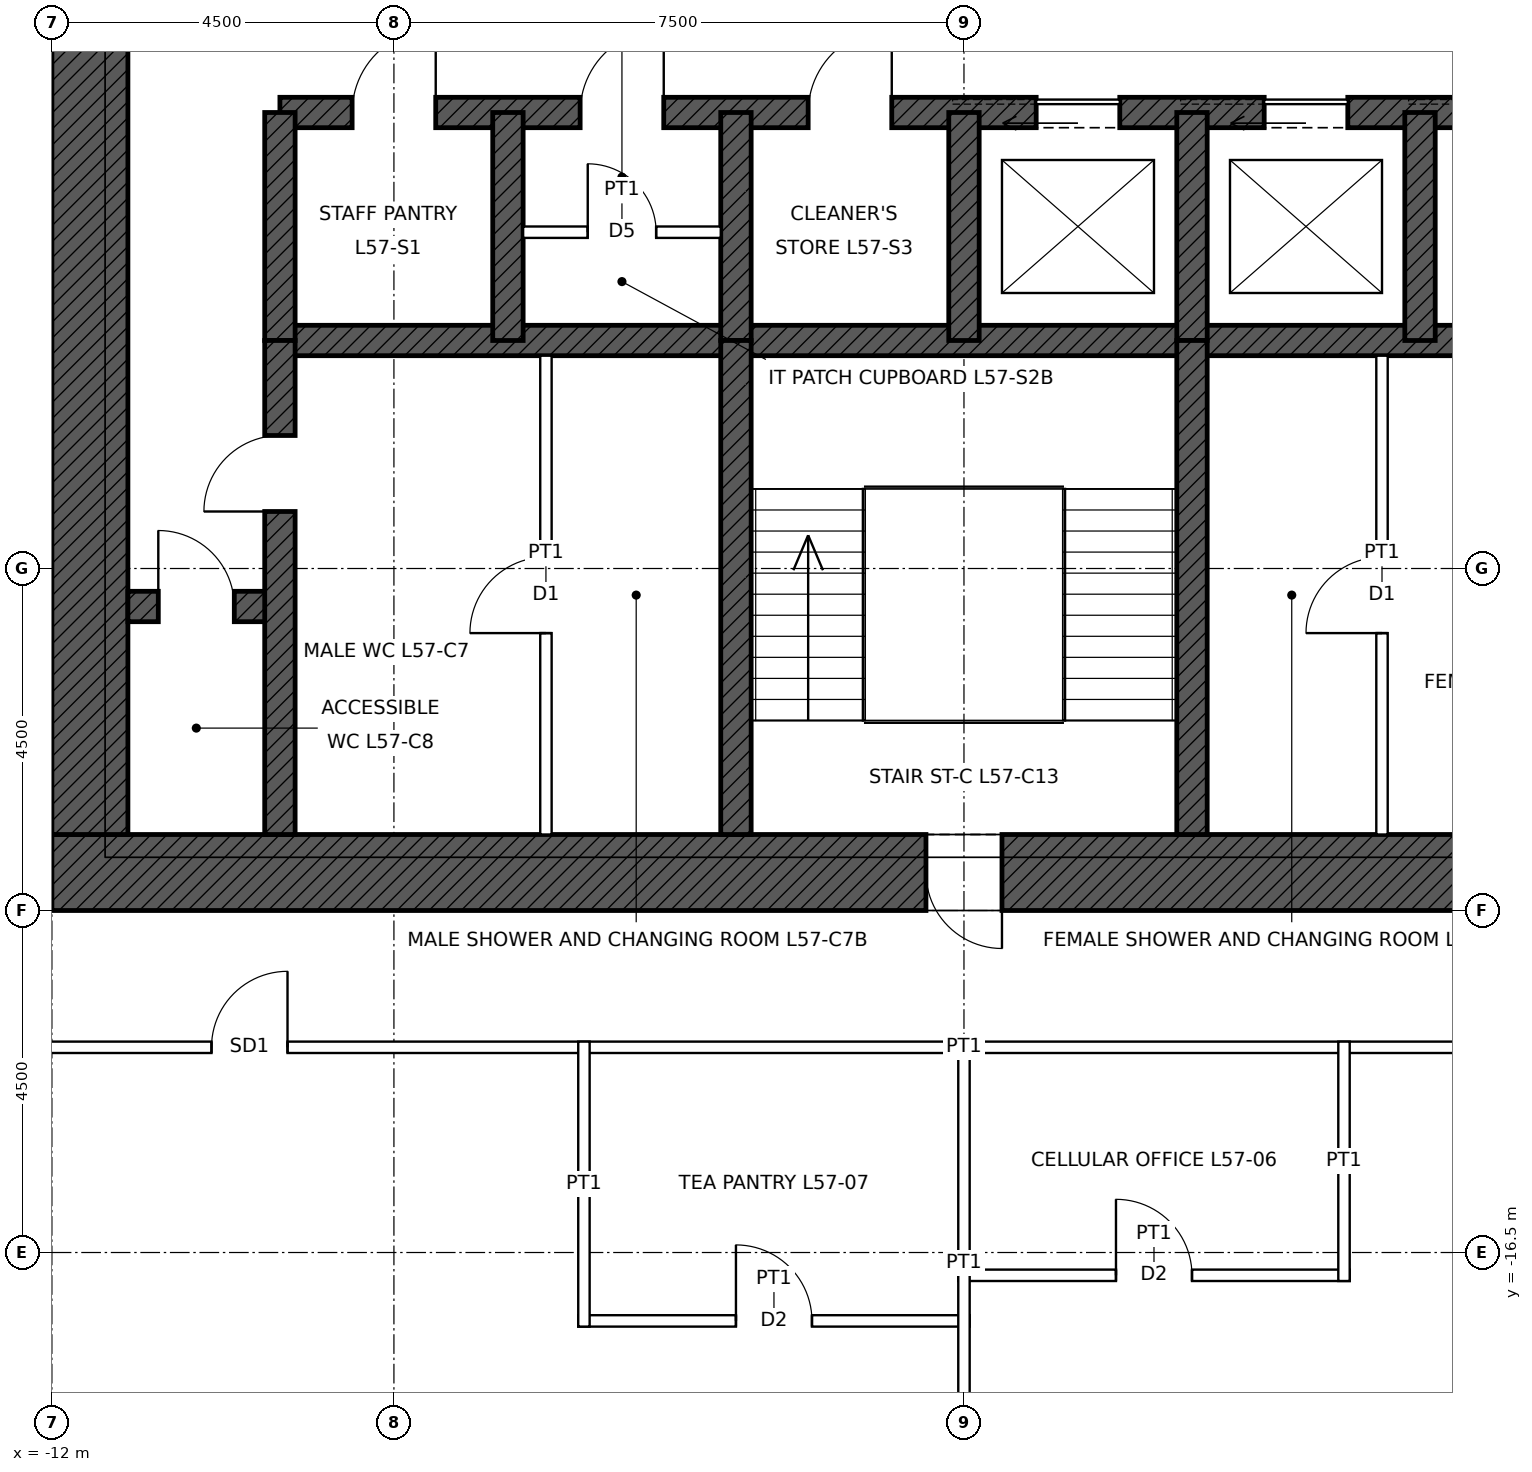
"""IFC4 building model, lengths in metres.
Left out: names, types, materials, properties, quantities, classifications, styles, units other than length and angle.
Written with IfcOpenShell. Run it as: python <this file> out.ifc"""

import sys

from ifc_helpers import new_model, si_unit, direction, frame, frame_2d, origin, place, context, subcontext, project, spatial, rectangle, extrude, element, fill, save


model = new_model("IFC4")
c1 = context("Model", 3, precision=1e-05, world=origin(), true_north=direction((0.0, 1.0)))
c2 = subcontext(c1, "Body", "Model", "MODEL_VIEW")
j1 = project(units=[si_unit("LENGTHUNIT", "METRE"), si_unit("PLANEANGLEUNIT", "RADIAN")], contexts=[c1])
p1 = place(None, origin())
s1 = spatial("IfcSite", under=j1, at=p1, CompositionType="ELEMENT")
p2 = place(p1, origin())
s2 = spatial("IfcBuilding", under=s1, at=p2, CompositionType="ELEMENT")
p3 = place(p2, frame((0.0, 0.0, 263.9)))
s3 = spatial("IfcBuildingStorey", under=s2, at=p3, CompositionType="ELEMENT", Elevation=263.9)
p4 = place(p3, frame((12.0, -11.5, 0.0), z_axis=(0.0, 0.0, 1.0), x_axis=(-1.0, 0.0, 0.0)))
e1 = element("IfcWall", 1, at=p4, inside=s3, PredefinedType="SHEAR", context=c2, shape_type="SweptSolid", body=[
    extrude(rectangle(XDim=24.0, YDim=1.0, at=frame_2d((12.0, 0.0))), origin(), (0.0, 0.0, 1.0), 4.0),
])
p5 = place(p4, frame((11.5, 0.0, 0.0)))
e2 = element("IfcOpeningElement", 2, at=p5, cuts=e1, PredefinedType="OPENING", context=c2, shape_type="SweptSolid", body=[
    extrude(rectangle(XDim=1.0, YDim=2.1, at=frame_2d((0.5, 1.05))), frame((0.0, 0.51, 0.0), z_axis=(0.0, -1.0, 0.0), x_axis=(1.0, 0.0, 0.0)), (0.0, 0.0, 1.0), 1.02),
])
p6 = place(p4, frame((1.0, 0.0, 0.0)))
e3 = element("IfcOpeningElement", 3, at=p6, cuts=e1, PredefinedType="OPENING", context=c2, shape_type="SweptSolid", body=[
    extrude(rectangle(XDim=1.0, YDim=2.4, at=frame_2d((0.5, 1.2))), frame((0.0, 0.51, 0.0), z_axis=(0.0, -1.0, 0.0), x_axis=(1.0, 0.0, 0.0)), (0.0, 0.0, 1.0), 1.02),
])
p7 = place(p3, frame((-11.5, -11.0, 0.0), z_axis=(0.0, 0.0, 1.0), x_axis=(0.0, 1.0, 0.0)))
e4 = element("IfcWall", 4, at=p7, inside=s3, PredefinedType="SHEAR", context=c2, shape_type="SweptSolid", body=[
    extrude(rectangle(XDim=22.0, YDim=1.0, at=frame_2d((11.0, 0.0))), origin(), (0.0, 0.0, 1.0), 4.0),
])
p8 = place(p7, frame((10.5, 0.0, 0.0)))
e5 = element("IfcOpeningElement", 5, at=p8, cuts=e4, PredefinedType="OPENING", context=c2, shape_type="SweptSolid", body=[
    extrude(rectangle(XDim=1.0, YDim=2.4, at=frame_2d((0.5, 1.2))), frame((0.0, 0.51, 0.0), z_axis=(0.0, -1.0, 0.0), x_axis=(1.0, 0.0, 0.0)), (0.0, 0.0, 1.0), 1.02),
])
p9 = place(p3, frame((-9.0, -1.5, 0.0), z_axis=(0.0, 0.0, 1.0), x_axis=(1.0, 0.0, 0.0)))
e6 = element("IfcWall", 6, at=p9, inside=s3, PredefinedType="SHEAR", context=c2, shape_type="SweptSolid", body=[
    extrude(rectangle(XDim=18.0, YDim=0.4, at=frame_2d((9.0, 0.0))), origin(), (0.0, 0.0, 1.0), 4.0),
])
p10 = place(p9, frame((9.95, 0.0, 0.0)))
e7 = element("IfcOpeningElement", 7, at=p10, cuts=e6, PredefinedType="OPENING", context=c2, shape_type="SweptSolid", body=[
    extrude(rectangle(XDim=1.1, YDim=2.1, at=frame_2d((0.55, 1.05))), frame((0.0, 0.21, 0.0), z_axis=(0.0, -1.0, 0.0), x_axis=(1.0, 0.0, 0.0)), (0.0, 0.0, 1.0), 0.42),
])
p11 = place(p9, frame((12.95, 0.0, 0.0)))
e8 = element("IfcOpeningElement", 8, at=p11, cuts=e6, PredefinedType="OPENING", context=c2, shape_type="SweptSolid", body=[
    extrude(rectangle(XDim=1.1, YDim=2.1, at=frame_2d((0.55, 1.05))), frame((0.0, 0.21, 0.0), z_axis=(0.0, -1.0, 0.0), x_axis=(1.0, 0.0, 0.0)), (0.0, 0.0, 1.0), 0.42),
])
p12 = place(p9, frame((15.95, 0.0, 0.0)))
e9 = element("IfcOpeningElement", 9, at=p12, cuts=e6, PredefinedType="OPENING", context=c2, shape_type="SweptSolid", body=[
    extrude(rectangle(XDim=1.1, YDim=2.1, at=frame_2d((0.55, 1.05))), frame((0.0, 0.21, 0.0), z_axis=(0.0, -1.0, 0.0), x_axis=(1.0, 0.0, 0.0)), (0.0, 0.0, 1.0), 0.42),
])
p13 = place(p9, frame((0.95, 0.0, 0.0)))
e10 = element("IfcOpeningElement", 10, at=p13, cuts=e6, PredefinedType="OPENING", context=c2, shape_type="SweptSolid", body=[
    extrude(rectangle(XDim=1.1, YDim=2.1, at=frame_2d((0.55, 1.05))), frame((0.0, 0.21, 0.0), z_axis=(0.0, -1.0, 0.0), x_axis=(1.0, 0.0, 0.0)), (0.0, 0.0, 1.0), 0.42),
])
p14 = place(p9, frame((3.95, 0.0, 0.0)))
e11 = element("IfcOpeningElement", 11, at=p14, cuts=e6, PredefinedType="OPENING", context=c2, shape_type="SweptSolid", body=[
    extrude(rectangle(XDim=1.1, YDim=2.1, at=frame_2d((0.55, 1.05))), frame((0.0, 0.21, 0.0), z_axis=(0.0, -1.0, 0.0), x_axis=(1.0, 0.0, 0.0)), (0.0, 0.0, 1.0), 0.42),
])
p15 = place(p9, frame((6.95, 0.0, 0.0)))
e12 = element("IfcOpeningElement", 12, at=p15, cuts=e6, PredefinedType="OPENING", context=c2, shape_type="SweptSolid", body=[
    extrude(rectangle(XDim=1.1, YDim=2.1, at=frame_2d((0.55, 1.05))), frame((0.0, 0.21, 0.0), z_axis=(0.0, -1.0, 0.0), x_axis=(1.0, 0.0, 0.0)), (0.0, 0.0, 1.0), 0.42),
])
p16 = place(p3, frame((-9.0, -4.5, 0.0), z_axis=(0.0, 0.0, 1.0), x_axis=(1.0, 0.0, 0.0)))
e13 = element("IfcWall", 13, at=p16, inside=s3, PredefinedType="SHEAR", context=c2, shape_type="SweptSolid", body=[
    extrude(rectangle(XDim=18.0, YDim=0.4, at=frame_2d((9.0, 0.0))), origin(), (0.0, 0.0, 1.0), 4.0),
])
p17 = place(p3, frame((-11.0, -8.0, 0.0), z_axis=(0.0, 0.0, 1.0), x_axis=(1.0, 0.0, 0.0)))
e14 = element("IfcWall", 14, at=p17, inside=s3, PredefinedType="SHEAR", context=c2, shape_type="SweptSolid", body=[
    extrude(rectangle(XDim=2.0, YDim=0.4, at=frame_2d((1.0, 0.0))), origin(), (0.0, 0.0, 1.0), 4.0),
])
p18 = place(p17, frame((0.4, 0.0, 0.0)))
e15 = element("IfcOpeningElement", 15, at=p18, cuts=e14, PredefinedType="OPENING", context=c2, shape_type="SweptSolid", body=[
    extrude(rectangle(XDim=1.0, YDim=2.1, at=frame_2d((0.5, 1.05))), frame((0.0, 0.21, 0.0), z_axis=(0.0, -1.0, 0.0), x_axis=(1.0, 0.0, 0.0)), (0.0, 0.0, 1.0), 0.42),
])
for number, where, z_axis, x_axis in (
    (16, (-9.0, -4.5, 0.0), (0.0, 0.0, 1.0), (0.0, 1.0, 0.0)),
    (17, (-6.0, -4.5, 0.0), (0.0, 0.0, 1.0), (0.0, 1.0, 0.0)),
    (18, (-3.0, -4.5, 0.0), (0.0, 0.0, 1.0), (0.0, 1.0, 0.0)),
    (19, (0.0, -4.5, 0.0), (0.0, 0.0, 1.0), (0.0, 1.0, 0.0)),
    (20, (3.0, -4.5, 0.0), (0.0, 0.0, 1.0), (0.0, 1.0, 0.0)),
    (21, (6.0, -4.5, 0.0), (0.0, 0.0, 1.0), (0.0, 1.0, 0.0)),
):
    element("IfcWall", number, at=place(p3, frame(where, z_axis=z_axis, x_axis=x_axis)), inside=s3, PredefinedType="SHEAR", context=c2, shape_type="SweptSolid", body=[
        extrude(rectangle(XDim=3.0, YDim=0.4, at=frame_2d((1.5, 0.0))), origin(), (0.0, 0.0, 1.0), 4.0),
    ])
p19 = place(p3, frame((-9.0, -11.0, 0.0), z_axis=(0.0, 0.0, 1.0), x_axis=(0.0, 1.0, 0.0)))
e22 = element("IfcWall", 22, at=p19, inside=s3, PredefinedType="SHEAR", context=c2, shape_type="SweptSolid", body=[
    extrude(rectangle(XDim=6.5, YDim=0.4, at=frame_2d((3.25, 0.0))), origin(), (0.0, 0.0, 1.0), 4.0),
])
p20 = place(p19, frame((4.25, 0.0, 0.0)))
e23 = element("IfcOpeningElement", 23, at=p20, cuts=e22, PredefinedType="OPENING", context=c2, shape_type="SweptSolid", body=[
    extrude(rectangle(XDim=1.0, YDim=2.1, at=frame_2d((0.5, 1.05))), frame((0.0, 0.21, 0.0), z_axis=(0.0, -1.0, 0.0), x_axis=(1.0, 0.0, 0.0)), (0.0, 0.0, 1.0), 0.42),
])
for number, where, z_axis, x_axis in (
    (24, (-3.0, -11.0, 0.0), (0.0, 0.0, 1.0), (0.0, 1.0, 0.0)),
    (25, (3.0, -11.0, 0.0), (0.0, 0.0, 1.0), (0.0, 1.0, 0.0)),
):
    element("IfcWall", number, at=place(p3, frame(where, z_axis=z_axis, x_axis=x_axis)), inside=s3, PredefinedType="SHEAR", context=c2, shape_type="SweptSolid", body=[
        extrude(rectangle(XDim=6.5, YDim=0.4, at=frame_2d((3.25, 0.0))), origin(), (0.0, 0.0, 1.0), 4.0),
    ])
p21 = place(p3, frame((-5.075, -17.4, 0.0), z_axis=(0.0, 0.0, 1.0), x_axis=(1.0, 0.0, 0.0)))
e26 = element("IfcWall", 26, at=p21, inside=s3, PredefinedType="PARTITIONING", context=c2, shape_type="SweptSolid", body=[
    extrude(rectangle(XDim=5.15, YDim=0.15, at=frame_2d((2.575, 0.0))), origin(), (0.0, 0.0, 1.0), 3.85),
])
p22 = place(p21, frame((2.075, 0.0, 0.0)))
e27 = element("IfcOpeningElement", 27, at=p22, cuts=e26, PredefinedType="OPENING", context=c2, shape_type="SweptSolid", body=[
    extrude(rectangle(XDim=1.0, YDim=2.1, at=frame_2d((0.5, 1.05))), frame((0.0, 0.085, 0.0), z_axis=(0.0, -1.0, 0.0), x_axis=(1.0, 0.0, 0.0)), (0.0, 0.0, 1.0), 0.17),
])
p23 = place(p3, frame((-0.075, -16.8, 0.0), z_axis=(0.0, 0.0, 1.0), x_axis=(1.0, 0.0, 0.0)))
e28 = element("IfcWall", 28, at=p23, inside=s3, PredefinedType="PARTITIONING", context=c2, shape_type="SweptSolid", body=[
    extrude(rectangle(XDim=5.15, YDim=0.15, at=frame_2d((2.575, 0.0))), origin(), (0.0, 0.0, 1.0), 3.85),
])
p24 = place(p23, frame((2.075, 0.0, 0.0)))
e29 = element("IfcOpeningElement", 29, at=p24, cuts=e28, PredefinedType="OPENING", context=c2, shape_type="SweptSolid", body=[
    extrude(rectangle(XDim=1.0, YDim=2.1, at=frame_2d((0.5, 1.05))), frame((0.0, 0.085, 0.0), z_axis=(0.0, -1.0, 0.0), x_axis=(1.0, 0.0, 0.0)), (0.0, 0.0, 1.0), 0.17),
])
p25 = place(p3, frame((-13.875, -13.8, 0.0), z_axis=(0.0, 0.0, 1.0), x_axis=(1.0, 0.0, 0.0)))
e30 = element("IfcWall", 30, at=p25, inside=s3, PredefinedType="PARTITIONING", context=c2, shape_type="SweptSolid", body=[
    extrude(rectangle(XDim=27.75, YDim=0.15, at=frame_2d((13.875, 0.0))), origin(), (0.0, 0.0, 1.0), 3.85),
])
p26 = place(p25, frame((3.975, 0.0, 0.0)))
e31 = element("IfcOpeningElement", 31, at=p26, cuts=e30, PredefinedType="OPENING", context=c2, shape_type="SweptSolid", body=[
    extrude(rectangle(XDim=1.0, YDim=2.4, at=frame_2d((0.5, 1.2))), frame((0.0, 0.085, 0.0), z_axis=(0.0, -1.0, 0.0), x_axis=(1.0, 0.0, 0.0)), (0.0, 0.0, 1.0), 0.17),
])
p27 = place(p3, frame((-5.0, -17.475, 0.0), z_axis=(0.0, 0.0, 1.0), x_axis=(0.0, 1.0, 0.0)))
e32 = element("IfcWall", 32, at=p27, inside=s3, PredefinedType="PARTITIONING", context=c2, shape_type="SweptSolid", body=[
    extrude(rectangle(XDim=3.75, YDim=0.15, at=frame_2d((1.875, 0.0))), origin(), (0.0, 0.0, 1.0), 3.85),
])
p28 = place(p3, frame((0.0, -19.54, 0.0), z_axis=(0.0, 0.0, 1.0), x_axis=(0.0, 1.0, 0.0)))
e33 = element("IfcWall", 33, at=p28, inside=s3, PredefinedType="PARTITIONING", context=c2, shape_type="SweptSolid", body=[
    extrude(rectangle(XDim=5.815, YDim=0.15, at=frame_2d((2.907, 0.0))), origin(), (0.0, 0.0, 1.0), 3.243),
])
p29 = place(p3, frame((5.0, -16.875, 0.0), z_axis=(0.0, 0.0, 1.0), x_axis=(0.0, 1.0, 0.0)))
e34 = element("IfcWall", 34, at=p29, inside=s3, PredefinedType="PARTITIONING", context=c2, shape_type="SweptSolid", body=[
    extrude(rectangle(XDim=3.15, YDim=0.15, at=frame_2d((1.575, 0.0))), origin(), (0.0, 0.0, 1.0), 3.85),
])
p30 = place(p3, frame((-5.5, -11.0, 0.0), z_axis=(0.0, 0.0, 1.0), x_axis=(0.0, 1.0, 0.0)))
e35 = element("IfcWall", 35, at=p30, inside=s3, PredefinedType="PARTITIONING", context=c2, shape_type="SweptSolid", body=[
    extrude(rectangle(XDim=6.3, YDim=0.15, at=frame_2d((3.15, 0.0))), origin(), (0.0, 0.0, 1.0), 3.75),
])
p31 = place(p30, frame((2.65, 0.0, 0.0)))
e36 = element("IfcOpeningElement", 36, at=p31, cuts=e35, PredefinedType="OPENING", context=c2, shape_type="SweptSolid", body=[
    extrude(rectangle(XDim=1.0, YDim=2.1, at=frame_2d((0.5, 1.05))), frame((0.0, 0.085, 0.0), z_axis=(0.0, -1.0, 0.0), x_axis=(1.0, 0.0, 0.0)), (0.0, 0.0, 1.0), 0.17),
])
p32 = place(p3, frame((5.5, -11.0, 0.0), z_axis=(0.0, 0.0, 1.0), x_axis=(0.0, 1.0, 0.0)))
e37 = element("IfcWall", 37, at=p32, inside=s3, PredefinedType="PARTITIONING", context=c2, shape_type="SweptSolid", body=[
    extrude(rectangle(XDim=6.3, YDim=0.15, at=frame_2d((3.15, 0.0))), origin(), (0.0, 0.0, 1.0), 3.75),
])
p33 = place(p32, frame((2.65, 0.0, 0.0)))
e38 = element("IfcOpeningElement", 38, at=p33, cuts=e37, PredefinedType="OPENING", context=c2, shape_type="SweptSolid", body=[
    extrude(rectangle(XDim=1.0, YDim=2.1, at=frame_2d((0.5, 1.05))), frame((0.0, 0.085, 0.0), z_axis=(0.0, -1.0, 0.0), x_axis=(1.0, 0.0, 0.0)), (0.0, 0.0, 1.0), 0.17),
])
p34 = place(p3, frame((-5.8, -3.075, 0.0), z_axis=(0.0, 0.0, 1.0), x_axis=(1.0, 0.0, 0.0)))
e39 = element("IfcWall", 39, at=p34, inside=s3, PredefinedType="PARTITIONING", context=c2, shape_type="SweptSolid", body=[
    extrude(rectangle(XDim=2.6, YDim=0.15, at=frame_2d((1.3, 0.0))), origin(), (0.0, 0.0, 1.0), 3.75),
])
p35 = place(p34, frame((0.85, 0.0, 0.0)))
e40 = element("IfcOpeningElement", 40, at=p35, cuts=e39, PredefinedType="OPENING", context=c2, shape_type="SweptSolid", body=[
    extrude(rectangle(XDim=0.9, YDim=2.1, at=frame_2d((0.45, 1.05))), frame((0.0, 0.085, 0.0), z_axis=(0.0, -1.0, 0.0), x_axis=(1.0, 0.0, 0.0)), (0.0, 0.0, 1.0), 0.17),
])
p36 = place(p5, origin())
e41 = element("IfcDoor", 41, at=p36, inside=s3, OperationType="SINGLE_SWING_LEFT", PredefinedType="DOOR", context=c2, shape_type="SweptSolid", body=[
    extrude(rectangle(XDim=1.0, YDim=2.1, at=frame_2d((0.5, 1.05))), frame((0.0, 0.485, 0.0), z_axis=(0.0, -1.0, 0.0), x_axis=(1.0, 0.0, 0.0)), (0.0, 0.0, 1.0), 0.05),
])
fill(e2, e41)
p37 = place(p20, origin())
e42 = element("IfcDoor", 42, at=p37, inside=s3, OperationType="SINGLE_SWING_LEFT", PredefinedType="DOOR", context=c2, shape_type="SweptSolid", body=[
    extrude(rectangle(XDim=1.0, YDim=2.1, at=frame_2d((0.5, 1.05))), frame((0.0, 0.025, 0.0), z_axis=(0.0, -1.0, 0.0), x_axis=(1.0, 0.0, 0.0)), (0.0, 0.0, 1.0), 0.05),
])
fill(e23, e42)
p38 = place(p18, origin())
e43 = element("IfcDoor", 43, at=p38, inside=s3, OperationType="SINGLE_SWING_LEFT", PredefinedType="DOOR", context=c2, shape_type="SweptSolid", body=[
    extrude(rectangle(XDim=1.0, YDim=2.1, at=frame_2d((0.5, 1.05))), frame((0.0, 0.025, 0.0), z_axis=(0.0, -1.0, 0.0), x_axis=(1.0, 0.0, 0.0)), (0.0, 0.0, 1.0), 0.05),
])
fill(e15, e43)
p39 = place(p10, origin())
e44 = element("IfcDoor", 44, at=p39, inside=s3, OperationType="SLIDING_TO_LEFT", PredefinedType="DOOR", context=c2, shape_type="SweptSolid", body=[
    extrude(rectangle(XDim=1.1, YDim=2.1, at=frame_2d((0.55, 1.05))), frame((0.0, 0.025, 0.0), z_axis=(0.0, -1.0, 0.0), x_axis=(1.0, 0.0, 0.0)), (0.0, 0.0, 1.0), 0.05),
])
fill(e7, e44)
p40 = place(p11, origin())
e45 = element("IfcDoor", 45, at=p40, inside=s3, OperationType="SLIDING_TO_LEFT", PredefinedType="DOOR", context=c2, shape_type="SweptSolid", body=[
    extrude(rectangle(XDim=1.1, YDim=2.1, at=frame_2d((0.55, 1.05))), frame((0.0, 0.025, 0.0), z_axis=(0.0, -1.0, 0.0), x_axis=(1.0, 0.0, 0.0)), (0.0, 0.0, 1.0), 0.05),
])
fill(e8, e45)
p41 = place(p31, origin())
e46 = element("IfcDoor", 46, at=p41, inside=s3, OperationType="SINGLE_SWING_LEFT", PredefinedType="DOOR", context=c2, shape_type="SweptSolid", body=[
    extrude(rectangle(XDim=1.0, YDim=2.1, at=frame_2d((0.5, 1.05))), frame((0.0, 0.025, 0.0), z_axis=(0.0, -1.0, 0.0), x_axis=(1.0, 0.0, 0.0)), (0.0, 0.0, 1.0), 0.05),
])
fill(e36, e46)
p42 = place(p33, origin())
e47 = element("IfcDoor", 47, at=p42, inside=s3, OperationType="SINGLE_SWING_LEFT", PredefinedType="DOOR", context=c2, shape_type="SweptSolid", body=[
    extrude(rectangle(XDim=1.0, YDim=2.1, at=frame_2d((0.5, 1.05))), frame((0.0, 0.025, 0.0), z_axis=(0.0, -1.0, 0.0), x_axis=(1.0, 0.0, 0.0)), (0.0, 0.0, 1.0), 0.05),
])
fill(e38, e47)
p43 = place(p13, origin())
e48 = element("IfcDoor", 48, at=p43, inside=s3, OperationType="SINGLE_SWING_RIGHT", PredefinedType="DOOR", context=c2, shape_type="SweptSolid", body=[
    extrude(rectangle(XDim=1.1, YDim=2.1, at=frame_2d((0.55, 1.05))), frame((0.0, 0.025, 0.0), z_axis=(0.0, -1.0, 0.0), x_axis=(1.0, 0.0, 0.0)), (0.0, 0.0, 1.0), 0.05),
])
fill(e10, e48)
p44 = place(p14, origin())
e49 = element("IfcDoor", 49, at=p44, inside=s3, OperationType="SINGLE_SWING_RIGHT", PredefinedType="DOOR", context=c2, shape_type="SweptSolid", body=[
    extrude(rectangle(XDim=1.1, YDim=2.1, at=frame_2d((0.55, 1.05))), frame((0.0, 0.025, 0.0), z_axis=(0.0, -1.0, 0.0), x_axis=(1.0, 0.0, 0.0)), (0.0, 0.0, 1.0), 0.05),
])
fill(e11, e49)
p45 = place(p35, origin())
e50 = element("IfcDoor", 50, at=p45, inside=s3, OperationType="SINGLE_SWING_LEFT", PredefinedType="DOOR", context=c2, shape_type="SweptSolid", body=[
    extrude(rectangle(XDim=0.9, YDim=2.1, at=frame_2d((0.45, 1.05))), frame((0.0, 0.025, 0.0), z_axis=(0.0, -1.0, 0.0), x_axis=(1.0, 0.0, 0.0)), (0.0, 0.0, 1.0), 0.05),
])
fill(e40, e50)
p46 = place(p15, origin())
e51 = element("IfcDoor", 51, at=p46, inside=s3, OperationType="SINGLE_SWING_RIGHT", PredefinedType="DOOR", context=c2, shape_type="SweptSolid", body=[
    extrude(rectangle(XDim=1.1, YDim=2.1, at=frame_2d((0.55, 1.05))), frame((0.0, 0.025, 0.0), z_axis=(0.0, -1.0, 0.0), x_axis=(1.0, 0.0, 0.0)), (0.0, 0.0, 1.0), 0.05),
])
fill(e12, e51)
p47 = place(p24, origin())
e52 = element("IfcDoor", 52, at=p47, inside=s3, OperationType="SINGLE_SWING_LEFT", PredefinedType="DOOR", context=c2, shape_type="SweptSolid", body=[
    extrude(rectangle(XDim=1.0, YDim=2.1, at=frame_2d((0.5, 1.05))), frame((0.0, 0.025, 0.0), z_axis=(0.0, -1.0, 0.0), x_axis=(1.0, 0.0, 0.0)), (0.0, 0.0, 1.0), 0.05),
])
fill(e29, e52)
p48 = place(p22, origin())
e53 = element("IfcDoor", 53, at=p48, inside=s3, OperationType="SINGLE_SWING_LEFT", PredefinedType="DOOR", context=c2, shape_type="SweptSolid", body=[
    extrude(rectangle(XDim=1.0, YDim=2.1, at=frame_2d((0.5, 1.05))), frame((0.0, 0.025, 0.0), z_axis=(0.0, -1.0, 0.0), x_axis=(1.0, 0.0, 0.0)), (0.0, 0.0, 1.0), 0.05),
])
fill(e27, e53)
p49 = place(p26, origin())
e54 = element("IfcDoor", 54, at=p49, inside=s3, OperationType="SINGLE_SWING_RIGHT", PredefinedType="DOOR", context=c2, shape_type="SweptSolid", body=[
    extrude(rectangle(XDim=1.0, YDim=2.4, at=frame_2d((0.5, 1.2))), frame((0.0, 0.025, 0.0), z_axis=(0.0, -1.0, 0.0), x_axis=(1.0, 0.0, 0.0)), (0.0, 0.0, 1.0), 0.05),
])
fill(e31, e54)
save(model, sys.argv[1])
